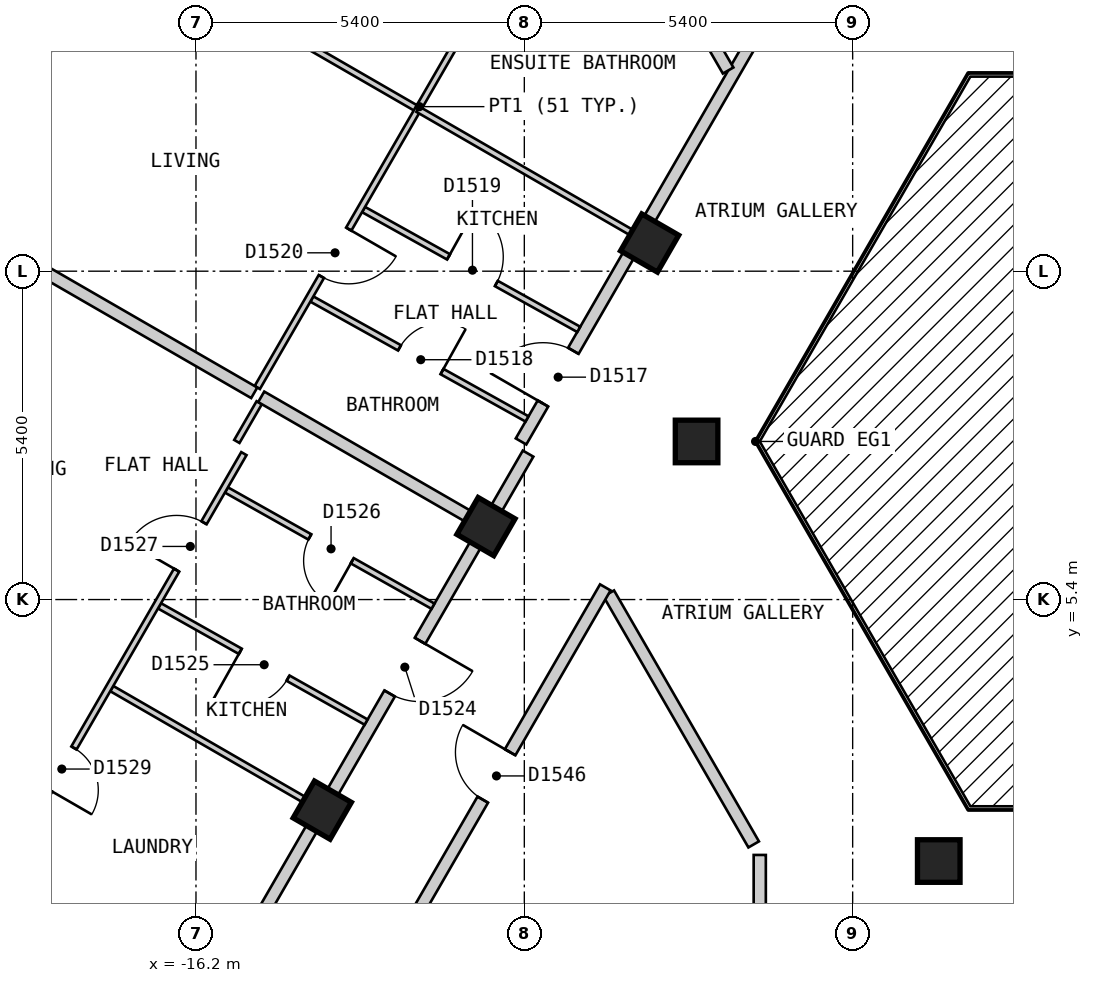
"""IFC4 building model, lengths in metres.
Left out: names, types, materials, properties, quantities, classifications, styles, units other than length and angle.
Written with IfcOpenShell. Run it as: python <this file> out.ifc"""

import sys

from ifc_helpers import new_model, si_unit, direction, frame, frame_2d, origin, origin_2d, place, context, subcontext, project, spatial, polyline, rectangle, outline, extrude, element, fill, save


model = new_model("IFC4")
c1 = context("Model", 3, precision=1e-05, world=origin(), true_north=direction((0.0, 1.0)))
c2 = subcontext(c1, "Body", "Model", "MODEL_VIEW")
j1 = project(units=[si_unit("LENGTHUNIT", "METRE"), si_unit("PLANEANGLEUNIT", "RADIAN")], contexts=[c1])
p1 = place(None, origin())
s1 = spatial("IfcSite", under=j1, at=p1, CompositionType="ELEMENT")
p2 = place(p1, origin())
s2 = spatial("IfcBuilding", under=s1, at=p2, CompositionType="ELEMENT")
p3 = place(p2, frame((0.0, 0.0, 190.2)))
s3 = spatial("IfcBuildingStorey", under=s2, at=p3, CompositionType="ELEMENT", Elevation=190.2)
for number, where, z_axis, x_axis in (
    (1, (-8.739, 11.263, 0.0), (0.0, 0.0, 1.0), (-0.5, -0.866, 0.0)),
    (2, (-7.967, 8.0, 0.0), (0.0, 0.0, 1.0), (1.0, 0.0, 0.0)),
    (3, (-11.431, 6.6, 0.0), (0.0, 0.0, 1.0), (-0.5, -0.866, 0.0)),
    (4, (-3.984, 1.1, 0.0), (0.0, 0.0, 1.0), (1.0, 0.0, 0.0)),
    (5, (-14.123, 1.937, 0.0), (0.0, 0.0, 1.0), (-0.5, -0.866, 0.0)),
):
    element("IfcColumn", number, at=place(p3, frame(where, z_axis=z_axis, x_axis=x_axis)), inside=s3, PredefinedType="COLUMN", context=c2, shape_type="SweptSolid", body=[
        extrude(rectangle(XDim=0.7, YDim=0.7, at=origin_2d()), origin(), (0.0, 0.0, 1.0), 3.0),
    ])
p4 = place(p3, frame((-14.592, 21.625, 0.0), z_axis=(0.0, 0.0, 1.0), x_axis=(-0.500010537973, -0.866019319597, 0.0)))
e6 = element("IfcWall", 6, at=p4, inside=s3, PredefinedType="SOLIDWALL", context=c2, shape_type="SweptSolid", body=[
    extrude(outline(polyline([(0.0, -0.15), (22.863, -0.15), (22.783, 0.15), (0.08, 0.15), (0.0, -0.15)])), origin(), (0.0, 0.0, 1.0), 2.7),
])
p5 = place(p4, frame((1.259, 0.0, 0.15)))
e7 = element("IfcOpeningElement", 7, at=p5, cuts=e6, PredefinedType="OPENING", context=c2, shape_type="SweptSolid", body=[
    extrude(rectangle(XDim=1.5, YDim=2.1, at=frame_2d((0.75, 1.05))), frame((0.0, 0.16, 0.0), z_axis=(0.0, -1.0, 0.0), x_axis=(1.0, 0.0, 0.0)), (0.0, 0.0, 1.0), 0.32),
])
p6 = place(p4, frame((3.952, 0.0, 0.15)))
e8 = element("IfcOpeningElement", 8, at=p6, cuts=e6, PredefinedType="OPENING", context=c2, shape_type="SweptSolid", body=[
    extrude(rectangle(XDim=1.5, YDim=2.1, at=frame_2d((0.75, 1.05))), frame((0.0, 0.16, 0.0), z_axis=(0.0, -1.0, 0.0), x_axis=(1.0, 0.0, 0.0)), (0.0, 0.0, 1.0), 0.32),
])
p7 = place(p4, frame((6.644, 0.0, 0.15)))
e9 = element("IfcOpeningElement", 9, at=p7, cuts=e6, PredefinedType="OPENING", context=c2, shape_type="SweptSolid", body=[
    extrude(rectangle(XDim=1.5, YDim=2.1, at=frame_2d((0.75, 1.05))), frame((0.0, 0.16, 0.0), z_axis=(0.0, -1.0, 0.0), x_axis=(1.0, 0.0, 0.0)), (0.0, 0.0, 1.0), 0.32),
])
p8 = place(p4, frame((9.335, 0.0, 0.15)))
e10 = element("IfcOpeningElement", 10, at=p8, cuts=e6, PredefinedType="OPENING", context=c2, shape_type="SweptSolid", body=[
    extrude(rectangle(XDim=1.5, YDim=2.1, at=frame_2d((0.75, 1.05))), frame((0.0, 0.16, 0.0), z_axis=(0.0, -1.0, 0.0), x_axis=(1.0, 0.0, 0.0)), (0.0, 0.0, 1.0), 0.32),
])
p9 = place(p4, frame((12.028, 0.0, 0.15)))
e11 = element("IfcOpeningElement", 11, at=p9, cuts=e6, PredefinedType="OPENING", context=c2, shape_type="SweptSolid", body=[
    extrude(rectangle(XDim=1.5, YDim=2.1, at=frame_2d((0.75, 1.05))), frame((0.0, 0.16, 0.0), z_axis=(0.0, -1.0, 0.0), x_axis=(1.0, 0.0, 0.0)), (0.0, 0.0, 1.0), 0.32),
])
p10 = place(p4, frame((14.72, 0.0, 0.15)))
e12 = element("IfcOpeningElement", 12, at=p10, cuts=e6, PredefinedType="OPENING", context=c2, shape_type="SweptSolid", body=[
    extrude(rectangle(XDim=1.5, YDim=2.1, at=frame_2d((0.75, 1.05))), frame((0.0, 0.16, 0.0), z_axis=(0.0, -1.0, 0.0), x_axis=(1.0, 0.0, 0.0)), (0.0, 0.0, 1.0), 0.32),
])
p11 = place(p4, frame((17.411, 0.0, 0.15)))
e13 = element("IfcOpeningElement", 13, at=p11, cuts=e6, PredefinedType="OPENING", context=c2, shape_type="SweptSolid", body=[
    extrude(rectangle(XDim=1.5, YDim=2.1, at=frame_2d((0.75, 1.05))), frame((0.0, 0.16, 0.0), z_axis=(0.0, -1.0, 0.0), x_axis=(1.0, 0.0, 0.0)), (0.0, 0.0, 1.0), 0.32),
])
p12 = place(p4, frame((20.104, 0.0, 0.15)))
e14 = element("IfcOpeningElement", 14, at=p12, cuts=e6, PredefinedType="OPENING", context=c2, shape_type="SweptSolid", body=[
    extrude(rectangle(XDim=1.5, YDim=2.1, at=frame_2d((0.75, 1.05))), frame((0.0, 0.16, 0.0), z_axis=(0.0, -1.0, 0.0), x_axis=(1.0, 0.0, 0.0)), (0.0, 0.0, 1.0), 0.32),
])
p13 = place(p3, frame((-9.411, 5.5, 0.0), z_axis=(0.0, 0.0, 1.0), x_axis=(0.500018099276, -0.86601495391, 0.0)))
e15 = element("IfcWall", 15, at=p13, inside=s3, PredefinedType="PARTITIONING", context=c2, shape_type="SweptSolid", body=[
    extrude(rectangle(XDim=4.765, YDim=0.2, at=frame_2d((2.383, 0.0))), origin(), (0.0, 0.0, 1.0), 2.7),
])
p14 = place(p3, frame((-13.048, -0.601, 0.0), z_axis=(0.0, 0.0, 1.0), x_axis=(0.499982180423, 0.866035691677, 0.0)))
e16 = element("IfcWall", 16, at=p14, inside=s3, PredefinedType="PARTITIONING", context=c2, shape_type="SweptSolid", body=[
    extrude(rectangle(XDim=7.16, YDim=0.2, at=frame_2d((3.58, 0.0))), origin(), (0.0, 0.0, 1.0), 2.7),
])
p15 = place(p14, frame((3.13, 0.0, 0.0)))
e17 = element("IfcOpeningElement", 17, at=p15, cuts=e16, PredefinedType="OPENING", context=c2, shape_type="SweptSolid", body=[
    extrude(rectangle(XDim=0.9, YDim=2.1, at=frame_2d((0.45, 1.05))), frame((0.0, 0.11, 0.0), z_axis=(0.0, -1.0, 0.0), x_axis=(1.0, 0.0, 0.0)), (0.0, 0.0, 1.0), 0.22),
])
p16 = place(p3, frame((-15.559, -0.551, 0.0), z_axis=(0.0, 0.0, 1.0), x_axis=(0.499964997208, 0.866045611713, 0.0)))
e18 = element("IfcWall", 18, at=p16, inside=s3, PredefinedType="PARTITIONING", context=c2, shape_type="SweptSolid", body=[
    extrude(rectangle(XDim=9.643, YDim=0.2, at=frame_2d((4.821, 0.0))), origin(), (0.0, 0.0, 1.0), 2.7),
])
p17 = place(p16, frame((5.088, 0.0, 0.0)))
e19 = element("IfcOpeningElement", 19, at=p17, cuts=e18, PredefinedType="OPENING", context=c2, shape_type="SweptSolid", body=[
    extrude(rectangle(XDim=1.0, YDim=2.1, at=frame_2d((0.5, 1.05))), frame((0.0, 0.11, 0.0), z_axis=(0.0, -1.0, 0.0), x_axis=(1.0, 0.0, 0.0)), (0.0, 0.0, 1.0), 0.22),
])
p18 = place(p3, frame((-10.854, 8.0, 0.0), z_axis=(0.0, 0.0, 1.0), x_axis=(0.499997637144, 0.866026767976, 0.0)))
e20 = element("IfcWall", 20, at=p18, inside=s3, PredefinedType="PARTITIONING", context=c2, shape_type="SweptSolid", body=[
    extrude(rectangle(XDim=10.854, YDim=0.2, at=frame_2d((5.427, 0.0))), origin(), (0.0, 0.0, 1.0), 2.7),
])
p19 = place(p18, frame((0.721, 0.0, 0.0)))
e21 = element("IfcOpeningElement", 21, at=p19, cuts=e20, PredefinedType="OPENING", context=c2, shape_type="SweptSolid", body=[
    extrude(rectangle(XDim=1.0, YDim=2.1, at=frame_2d((0.5, 1.05))), frame((0.0, 0.11, 0.0), z_axis=(0.0, -1.0, 0.0), x_axis=(1.0, 0.0, 0.0)), (0.0, 0.0, 1.0), 0.22),
])
p20 = place(p3, frame((-6.928, -2.8, 0.0), z_axis=(0.0, 0.0, 1.0), x_axis=(0.0, 1.0, 0.0)))
e22 = element("IfcWall", 22, at=p20, inside=s3, PredefinedType="PARTITIONING", context=c2, shape_type="SweptSolid", body=[
    extrude(rectangle(XDim=4.0, YDim=0.2, at=frame_2d((2.0, 0.0))), origin(), (0.0, 0.0, 1.0), 2.7),
])
p21 = place(p3, frame((-13.444, 11.814, 0.0), z_axis=(0.0, 0.0, 1.0), x_axis=(0.873653620945, -0.486548405207, 0.0)))
e23 = element("IfcWall", 23, at=p21, inside=s3, PredefinedType="PARTITIONING", context=c2, shape_type="SweptSolid", body=[
    extrude(rectangle(XDim=4.051, YDim=0.1, at=frame_2d((2.025, 0.0))), origin(), (0.0, 0.0, 1.0), 2.7),
])
p22 = place(p21, frame((1.6, 0.0, 0.0)))
e24 = element("IfcOpeningElement", 24, at=p22, cuts=e23, PredefinedType="OPENING", context=c2, shape_type="SweptSolid", body=[
    extrude(rectangle(XDim=0.9, YDim=2.1, at=frame_2d((0.45, 1.05))), frame((0.0, 0.06, 0.0), z_axis=(0.0, -1.0, 0.0), x_axis=(1.0, 0.0, 0.0)), (0.0, 0.0, 1.0), 0.12),
])
p23 = place(p3, frame((-14.294, 10.342, 0.0), z_axis=(0.0, 0.0, 1.0), x_axis=(0.873582256032, -0.486676527013, 0.0)))
e25 = element("IfcWall", 25, at=p23, inside=s3, PredefinedType="PARTITIONING", context=c2, shape_type="SweptSolid", body=[
    extrude(rectangle(XDim=4.05, YDim=0.1, at=frame_2d((2.025, 0.0))), origin(), (0.0, 0.0, 1.0), 2.7),
])
p24 = place(p23, frame((1.65, 0.0, 0.0)))
e26 = element("IfcOpeningElement", 26, at=p24, cuts=e25, PredefinedType="OPENING", context=c2, shape_type="SweptSolid", body=[
    extrude(rectangle(XDim=0.8, YDim=2.1, at=frame_2d((0.4, 1.05))), frame((0.0, 0.06, 0.0), z_axis=(0.0, -1.0, 0.0), x_axis=(1.0, 0.0, 0.0)), (0.0, 0.0, 1.0), 0.12),
])
p25 = place(p3, frame((-16.799, 5.296, 0.0), z_axis=(0.0, 0.0, 1.0), x_axis=(0.871565499758, -0.490279083413, 0.0)))
e27 = element("IfcWall", 27, at=p25, inside=s3, PredefinedType="PARTITIONING", context=c2, shape_type="SweptSolid", body=[
    extrude(rectangle(XDim=3.897, YDim=0.1, at=frame_2d((1.949, 0.0))), origin(), (0.0, 0.0, 1.0), 2.7),
])
p26 = place(p25, frame((1.524, 0.0, 0.0)))
e28 = element("IfcOpeningElement", 28, at=p26, cuts=e27, PredefinedType="OPENING", context=c2, shape_type="SweptSolid", body=[
    extrude(rectangle(XDim=0.9, YDim=2.1, at=frame_2d((0.45, 1.05))), frame((0.0, 0.06, 0.0), z_axis=(0.0, -1.0, 0.0), x_axis=(1.0, 0.0, 0.0)), (0.0, 0.0, 1.0), 0.12),
])
p27 = place(p3, frame((-15.699, 7.202, 0.0), z_axis=(0.0, 0.0, 1.0), x_axis=(0.871565499758, -0.490279083413, 0.0)))
e29 = element("IfcWall", 29, at=p27, inside=s3, PredefinedType="PARTITIONING", context=c2, shape_type="SweptSolid", body=[
    extrude(rectangle(XDim=3.897, YDim=0.1, at=frame_2d((1.949, 0.0))), origin(), (0.0, 0.0, 1.0), 2.7),
])
p28 = place(p27, frame((1.574, 0.0, 0.0)))
e30 = element("IfcOpeningElement", 30, at=p28, cuts=e29, PredefinedType="OPENING", context=c2, shape_type="SweptSolid", body=[
    extrude(rectangle(XDim=0.8, YDim=2.1, at=frame_2d((0.4, 1.05))), frame((0.0, 0.06, 0.0), z_axis=(0.0, -1.0, 0.0), x_axis=(1.0, 0.0, 0.0)), (0.0, 0.0, 1.0), 0.12),
])
p29 = place(p3, frame((-17.585, 3.936, 0.0), z_axis=(0.0, 0.0, 1.0), x_axis=(0.865979019114, -0.500080332001, 0.0)))
e31 = element("IfcWall", 31, at=p29, inside=s3, PredefinedType="PARTITIONING", context=c2, shape_type="SweptSolid", body=[
    extrude(rectangle(XDim=3.897, YDim=0.1, at=frame_2d((1.949, 0.0))), origin(), (0.0, 0.0, 1.0), 2.7),
])
p30 = place(p3, frame((-17.486, 16.313, 0.0), z_axis=(0.0, 0.0, 1.0), x_axis=(0.866004402611, -0.500036373335, 0.0)))
e32 = element("IfcWall", 32, at=p30, inside=s3, PredefinedType="PARTITIONING", context=c2, shape_type="SweptSolid", body=[
    extrude(rectangle(XDim=5.7, YDim=0.1, at=frame_2d((2.85, 0.0))), origin(), (0.0, 0.0, 1.0), 2.7),
])
p31 = place(p30, frame((2.4, 0.0, 0.0)))
e33 = element("IfcOpeningElement", 33, at=p31, cuts=e32, PredefinedType="OPENING", context=c2, shape_type="SweptSolid", body=[
    extrude(rectangle(XDim=0.9, YDim=2.1, at=frame_2d((0.45, 1.05))), frame((0.0, 0.06, 0.0), z_axis=(0.0, -1.0, 0.0), x_axis=(1.0, 0.0, 0.0)), (0.0, 0.0, 1.0), 0.12),
])
p32 = place(p3, frame((-19.195, 1.247, 0.0), z_axis=(0.0, 0.0, 1.0), x_axis=(0.499959862915, 0.866048575701, 0.0)))
e34 = element("IfcWall", 34, at=p32, inside=s3, PredefinedType="PARTITIONING", context=c2, shape_type="SweptSolid", body=[
    extrude(rectangle(XDim=7.566, YDim=0.1, at=frame_2d((3.783, 0.0))), origin(), (0.0, 0.0, 1.0), 2.7),
])
p33 = place(p32, frame((5.354, 0.0, 0.0)))
e35 = element("IfcOpeningElement", 35, at=p33, cuts=e34, PredefinedType="OPENING", context=c2, shape_type="SweptSolid", body=[
    extrude(rectangle(XDim=0.9, YDim=2.1, at=frame_2d((0.45, 1.05))), frame((0.0, 0.06, 0.0), z_axis=(0.0, -1.0, 0.0), x_axis=(1.0, 0.0, 0.0)), (0.0, 0.0, 1.0), 0.12),
])
p34 = place(p32, frame((1.177, 0.0, 0.0)))
e36 = element("IfcOpeningElement", 36, at=p34, cuts=e34, PredefinedType="OPENING", context=c2, shape_type="SweptSolid", body=[
    extrude(rectangle(XDim=0.8, YDim=2.1, at=frame_2d((0.4, 1.05))), frame((0.0, 0.06, 0.0), z_axis=(0.0, -1.0, 0.0), x_axis=(1.0, 0.0, 0.0)), (0.0, 0.0, 1.0), 0.12),
])
p35 = place(p3, frame((-15.528, 8.0, 0.0), z_axis=(0.0, 0.0, 1.0), x_axis=(0.500421336976, 0.865782008071, 0.0)))
e37 = element("IfcWall", 37, at=p35, inside=s3, PredefinedType="PARTITIONING", context=c2, shape_type="SweptSolid", body=[
    extrude(rectangle(XDim=0.736, YDim=0.1, at=frame_2d((0.368, 0.0))), origin(), (0.0, 0.0, 1.0), 2.7),
])
p36 = place(p3, frame((-15.192, 8.887, 0.0), z_axis=(0.0, 0.0, 1.0), x_axis=(0.500028204665, 0.866009119201, 0.0)))
e38 = element("IfcWall", 38, at=p36, inside=s3, PredefinedType="PARTITIONING", context=c2, shape_type="SweptSolid", body=[
    extrude(rectangle(XDim=10.667, YDim=0.1, at=frame_2d((5.334, 0.0))), origin(), (0.0, 0.0, 1.0), 2.7),
])
p37 = place(p36, frame((2.108, 0.0, 0.0)))
e39 = element("IfcOpeningElement", 39, at=p37, cuts=e38, PredefinedType="OPENING", context=c2, shape_type="SweptSolid", body=[
    extrude(rectangle(XDim=0.9, YDim=2.1, at=frame_2d((0.45, 1.05))), frame((0.0, 0.06, 0.0), z_axis=(0.0, -1.0, 0.0), x_axis=(1.0, 0.0, 0.0)), (0.0, 0.0, 1.0), 0.12),
])
p38 = place(p36, frame((7.576, 0.0, 0.0)))
e40 = element("IfcOpeningElement", 40, at=p38, cuts=e38, PredefinedType="OPENING", context=c2, shape_type="SweptSolid", body=[
    extrude(rectangle(XDim=0.8, YDim=2.1, at=frame_2d((0.4, 1.05))), frame((0.0, 0.06, 0.0), z_axis=(0.0, -1.0, 0.0), x_axis=(1.0, 0.0, 0.0)), (0.0, 0.0, 1.0), 0.12),
])
p39 = place(p3, frame((-9.628, 17.877, 0.0), z_axis=(0.0, 0.0, 1.0), x_axis=(0.499890461358, -0.866088636713, 0.0)))
e41 = element("IfcWall", 41, at=p39, inside=s3, PredefinedType="PARTITIONING", context=c2, shape_type="SweptSolid", body=[
    extrude(rectangle(XDim=4.361, YDim=0.2, at=frame_2d((2.18, 0.0))), origin(), (0.0, 0.0, 1.0), 2.7),
])
p40 = place(p3, frame((-20.178, 11.65, 0.0), z_axis=(0.0, 0.0, 1.0), x_axis=(0.866022950691, -0.500004248858, 0.0)))
e42 = element("IfcWall", 42, at=p40, inside=s3, PredefinedType="PARTITIONING", context=c2, shape_type="SweptSolid", body=[
    extrude(rectangle(XDim=5.7, YDim=0.2, at=frame_2d((2.85, 0.0))), origin(), (0.0, 0.0, 1.0), 2.7),
])
p41 = place(p3, frame((-15.127, 8.734, 0.0), z_axis=(0.0, 0.0, 1.0), x_axis=(0.865984601828, -0.500070664403, 0.0)))
e43 = element("IfcWall", 43, at=p41, inside=s3, PredefinedType="PARTITIONING", context=c2, shape_type="SweptSolid", body=[
    extrude(rectangle(XDim=4.167, YDim=0.2, at=frame_2d((2.084, 0.0))), origin(), (0.0, 0.0, 1.0), 2.7),
])
p42 = place(p3, frame((-12.55, 13.463, 0.0), z_axis=(0.0, 0.0, 1.0), x_axis=(0.86606561423, -0.499930346997, 0.0)))
e44 = element("IfcWall", 44, at=p42, inside=s3, PredefinedType="PARTITIONING", context=c2, shape_type="SweptSolid", body=[
    extrude(rectangle(XDim=4.1, YDim=0.1, at=frame_2d((2.05, 0.0))), origin(), (0.0, 0.0, 1.0), 2.7),
])
p43 = place(p19, origin())
e45 = element("IfcDoor", 45, at=p43, inside=s3, OperationType="SINGLE_SWING_LEFT", PredefinedType="DOOR", context=c2, shape_type="SweptSolid", body=[
    extrude(rectangle(XDim=1.0, YDim=2.1, at=frame_2d((0.5, 1.05))), frame((0.0, 0.025, 0.0), z_axis=(0.0, -1.0, 0.0), x_axis=(1.0, 0.0, 0.0)), (0.0, 0.0, 1.0), 0.05),
])
fill(e21, e45)
p44 = place(p24, origin())
e46 = element("IfcDoor", 46, at=p44, inside=s3, OperationType="SINGLE_SWING_RIGHT", PredefinedType="DOOR", context=c2, shape_type="SweptSolid", body=[
    extrude(rectangle(XDim=0.8, YDim=2.1, at=frame_2d((0.4, 1.05))), frame((0.0, 0.025, 0.0), z_axis=(0.0, -1.0, 0.0), x_axis=(1.0, 0.0, 0.0)), (0.0, 0.0, 1.0), 0.05),
])
fill(e26, e46)
p45 = place(p22, origin())
e47 = element("IfcDoor", 47, at=p45, inside=s3, OperationType="SINGLE_SWING_LEFT", PredefinedType="DOOR", context=c2, shape_type="SweptSolid", body=[
    extrude(rectangle(XDim=0.9, YDim=2.1, at=frame_2d((0.45, 1.05))), frame((0.0, 0.025, 0.0), z_axis=(0.0, -1.0, 0.0), x_axis=(1.0, 0.0, 0.0)), (0.0, 0.0, 1.0), 0.05),
])
fill(e24, e47)
p46 = place(p37, origin())
e48 = element("IfcDoor", 48, at=p46, inside=s3, OperationType="SINGLE_SWING_RIGHT", PredefinedType="DOOR", context=c2, shape_type="SweptSolid", body=[
    extrude(rectangle(XDim=0.9, YDim=2.1, at=frame_2d((0.45, 1.05))), frame((0.0, 0.025, 0.0), z_axis=(0.0, -1.0, 0.0), x_axis=(1.0, 0.0, 0.0)), (0.0, 0.0, 1.0), 0.05),
])
fill(e39, e48)
p47 = place(p17, origin())
e49 = element("IfcDoor", 49, at=p47, inside=s3, OperationType="SINGLE_SWING_RIGHT", PredefinedType="DOOR", context=c2, shape_type="SweptSolid", body=[
    extrude(rectangle(XDim=1.0, YDim=2.1, at=frame_2d((0.5, 1.05))), frame((0.0, 0.025, 0.0), z_axis=(0.0, -1.0, 0.0), x_axis=(1.0, 0.0, 0.0)), (0.0, 0.0, 1.0), 0.05),
])
fill(e19, e49)
p48 = place(p26, origin())
e50 = element("IfcDoor", 50, at=p48, inside=s3, OperationType="SINGLE_SWING_LEFT", PredefinedType="DOOR", context=c2, shape_type="SweptSolid", body=[
    extrude(rectangle(XDim=0.9, YDim=2.1, at=frame_2d((0.45, 1.05))), frame((0.0, 0.025, 0.0), z_axis=(0.0, -1.0, 0.0), x_axis=(1.0, 0.0, 0.0)), (0.0, 0.0, 1.0), 0.05),
])
fill(e28, e50)
p49 = place(p28, origin())
e51 = element("IfcDoor", 51, at=p49, inside=s3, OperationType="SINGLE_SWING_RIGHT", PredefinedType="DOOR", context=c2, shape_type="SweptSolid", body=[
    extrude(rectangle(XDim=0.8, YDim=2.1, at=frame_2d((0.4, 1.05))), frame((0.0, 0.025, 0.0), z_axis=(0.0, -1.0, 0.0), x_axis=(1.0, 0.0, 0.0)), (0.0, 0.0, 1.0), 0.05),
])
fill(e30, e51)
p50 = place(p33, origin())
e52 = element("IfcDoor", 52, at=p50, inside=s3, OperationType="SINGLE_SWING_LEFT", PredefinedType="DOOR", context=c2, shape_type="SweptSolid", body=[
    extrude(rectangle(XDim=0.9, YDim=2.1, at=frame_2d((0.45, 1.05))), frame((0.0, 0.025, 0.0), z_axis=(0.0, -1.0, 0.0), x_axis=(1.0, 0.0, 0.0)), (0.0, 0.0, 1.0), 0.05),
])
fill(e35, e52)
p51 = place(p34, origin())
e53 = element("IfcDoor", 53, at=p51, inside=s3, OperationType="SINGLE_SWING_LEFT", PredefinedType="DOOR", context=c2, shape_type="SweptSolid", body=[
    extrude(rectangle(XDim=0.8, YDim=2.1, at=frame_2d((0.4, 1.05))), frame((0.0, 0.025, 0.0), z_axis=(0.0, -1.0, 0.0), x_axis=(1.0, 0.0, 0.0)), (0.0, 0.0, 1.0), 0.05),
])
fill(e36, e53)
p52 = place(p15, origin())
e54 = element("IfcDoor", 54, at=p52, inside=s3, OperationType="SINGLE_SWING_RIGHT", PredefinedType="DOOR", context=c2, shape_type="SweptSolid", body=[
    extrude(rectangle(XDim=0.9, YDim=2.1, at=frame_2d((0.45, 1.05))), frame((0.0, 0.025, 0.0), z_axis=(0.0, -1.0, 0.0), x_axis=(1.0, 0.0, 0.0)), (0.0, 0.0, 1.0), 0.05),
])
fill(e17, e54)
save(model, sys.argv[1])
